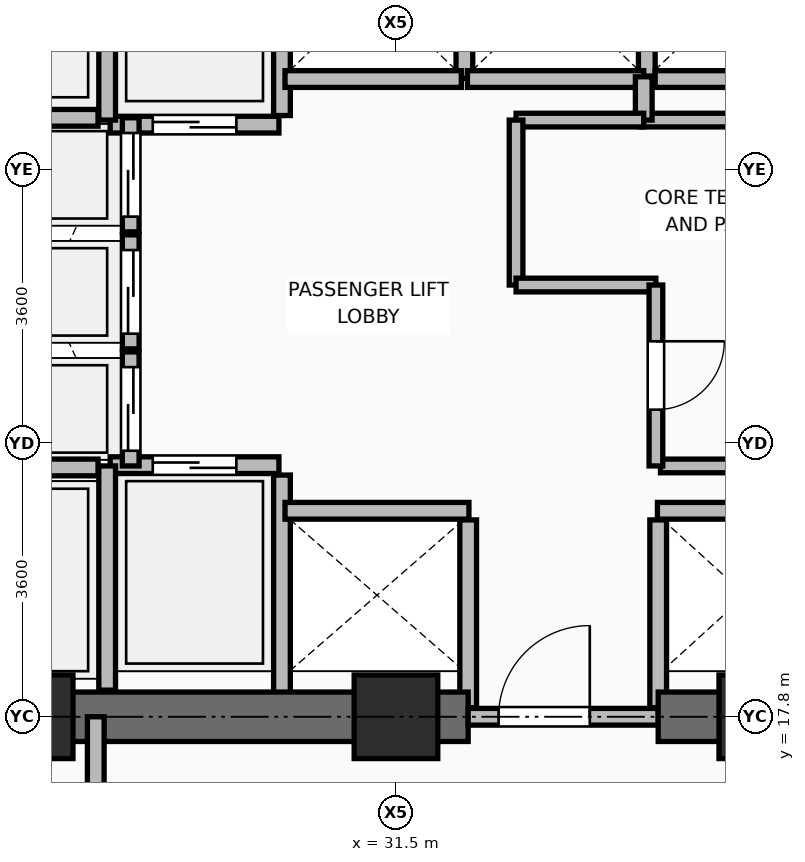
"""IFC4 building model, lengths in metres.
Left out: names, types, materials, properties, quantities, classifications, styles, units other than length and angle.
Written with IfcOpenShell. Run it as: python <this file> out.ifc"""

import sys

from ifc_helpers import new_model, si_unit, direction, frame, frame_2d, origin, origin_2d, place, context, subcontext, project, spatial, rectangle, extrude, element, fill, save


model = new_model("IFC4")
c1 = context("Model", 3, precision=1e-05, world=origin(), true_north=direction((0.0, 1.0)))
c2 = subcontext(c1, "Body", "Model", "MODEL_VIEW")
j1 = project(units=[si_unit("LENGTHUNIT", "METRE"), si_unit("PLANEANGLEUNIT", "RADIAN")], contexts=[c1])
p1 = place(None, origin())
s1 = spatial("IfcSite", under=j1, at=p1, CompositionType="ELEMENT")
p2 = place(p1, origin())
s2 = spatial("IfcBuilding", under=s1, at=p2, CompositionType="ELEMENT")
p3 = place(p2, frame((0.0, 0.0, 49.5)))
s3 = spatial("IfcBuildingStorey", under=s2, at=p3, CompositionType="ELEMENT", Elevation=49.5)
for number, where, z_axis, x_axis in (
    (1, (26.7, 17.8, 0.0), (0.0, 0.0, 1.0), (1.0, 0.0, 0.0)),
    (2, (31.5, 17.8, 0.0), (0.0, 0.0, 1.0), (1.0, 0.0, 0.0)),
    (3, (36.3, 17.8, 0.0), (0.0, 0.0, 1.0), (1.0, 0.0, 0.0)),
):
    element("IfcColumn", number, at=place(p3, frame(where, z_axis=z_axis, x_axis=x_axis)), inside=s3, PredefinedType="COLUMN", context=c2, shape_type="SweptSolid", body=[
        extrude(rectangle(XDim=1.1, YDim=1.1, at=origin_2d()), origin(), (0.0, 0.0, 1.0), 3.75),
    ])
p4 = place(p3, frame((30.0, 18.08, 0.0), z_axis=(0.0, 0.0, 1.0), x_axis=(0.0, 1.0, 0.0)))
e4 = element("IfcWall", 4, at=p4, inside=s3, PredefinedType="PARTITIONING", context=c2, shape_type="SweptSolid", body=[
    extrude(rectangle(XDim=2.9, YDim=0.22, at=frame_2d((1.45, 0.0))), origin(), (0.0, 0.0, 1.0), 3.545),
])
for number, where, z_axis, x_axis in (
    (5, (32.45, 17.92, 0.0), (0.0, 0.0, 1.0), (0.0, 1.0, 0.0)),
    (6, (34.95, 17.92, 0.0), (0.0, 0.0, 1.0), (0.0, 1.0, 0.0)),
):
    element("IfcWall", number, at=place(p3, frame(where, z_axis=z_axis, x_axis=x_axis)), inside=s3, PredefinedType="PARTITIONING", context=c2, shape_type="SweptSolid", body=[
        extrude(rectangle(XDim=2.47, YDim=0.22, at=frame_2d((1.235, 0.0))), origin(), (0.0, 0.0, 1.0), 2.928),
    ])
p5 = place(p3, frame((30.0, 25.71, 0.0), z_axis=(0.0, 0.0, 1.0), x_axis=(0.0, 1.0, 0.0)))
e7 = element("IfcWall", 7, at=p5, inside=s3, PredefinedType="PARTITIONING", context=c2, shape_type="SweptSolid", body=[
    extrude(rectangle(XDim=2.73, YDim=0.22, at=frame_2d((1.365, 0.0))), origin(), (0.0, 0.0, 1.0), 3.545),
])
p6 = place(p3, frame((32.4, 26.2, 0.0), z_axis=(0.0, 0.0, 1.0), x_axis=(0.0, 1.0, 0.0)))
e8 = element("IfcWall", 8, at=p6, inside=s3, PredefinedType="PARTITIONING", context=c2, shape_type="SweptSolid", body=[
    extrude(rectangle(XDim=2.24, YDim=0.22, at=frame_2d((1.12, 0.0))), origin(), (0.0, 0.0, 1.0), 3.545),
])
p7 = place(p3, frame((34.8, 26.23, 0.0), z_axis=(0.0, 0.0, 1.0), x_axis=(0.0, 1.0, 0.0)))
e9 = element("IfcWall", 9, at=p7, inside=s3, PredefinedType="PARTITIONING", context=c2, shape_type="SweptSolid", body=[
    extrude(rectangle(XDim=2.21, YDim=0.22, at=frame_2d((1.105, 0.0))), origin(), (0.0, 0.0, 1.0), 3.545),
])
p8 = place(p3, frame((34.91, 26.19, 0.0), z_axis=(0.0, 0.0, 1.0), x_axis=(1.0, 0.0, 0.0)))
e10 = element("IfcWall", 10, at=p8, inside=s3, PredefinedType="PARTITIONING", context=c2, shape_type="SweptSolid", body=[
    extrude(rectangle(XDim=2.14, YDim=0.22, at=frame_2d((1.07, 0.0))), origin(), (0.0, 0.0, 1.0), 3.545),
])
p9 = place(p3, frame((25.55, 17.8, 0.0), z_axis=(0.0, 0.0, 1.0), x_axis=(1.0, 0.0, 0.0)))
e11 = element("IfcWall", 11, at=p9, inside=s3, PredefinedType="SHEAR", context=c2, shape_type="SweptSolid", body=[
    extrude(rectangle(XDim=6.9, YDim=0.65, at=frame_2d((3.45, 0.0))), origin(), (0.0, 0.0, 1.0), 3.57),
])
p10 = place(p3, frame((32.45, 17.8, 0.0), z_axis=(0.0, 0.0, 1.0), x_axis=(1.0, 0.0, 0.0)))
e12 = element("IfcWall", 12, at=p10, inside=s3, PredefinedType="PARTITIONING", context=c2, shape_type="SweptSolid", body=[
    extrude(rectangle(XDim=2.5, YDim=0.22, at=frame_2d((1.25, 0.0))), origin(), (0.0, 0.0, 1.0), 2.928),
])
p11 = place(p10, frame((0.4, 0.0, 0.0)))
e13 = element("IfcOpeningElement", 13, at=p11, cuts=e12, PredefinedType="OPENING", context=c2, shape_type="SweptSolid", body=[
    extrude(rectangle(XDim=1.2, YDim=2.1, at=frame_2d((0.6, 1.05))), frame((0.0, 0.12, 0.0), z_axis=(0.0, -1.0, 0.0), x_axis=(1.0, 0.0, 0.0)), (0.0, 0.0, 1.0), 0.24),
])
p12 = place(p3, frame((34.95, 17.8, 0.0), z_axis=(0.0, 0.0, 1.0), x_axis=(1.0, 0.0, 0.0)))
e14 = element("IfcWall", 14, at=p12, inside=s3, PredefinedType="SHEAR", context=c2, shape_type="SweptSolid", body=[
    extrude(rectangle(XDim=6.475, YDim=0.65, at=frame_2d((3.238, 0.0))), origin(), (0.0, 0.0, 1.0), 3.57),
])
p13 = place(p3, frame((27.74, 21.11, 0.0), z_axis=(0.0, 0.0, 1.0), x_axis=(1.0, 0.0, 0.0)))
e15 = element("IfcWall", 15, at=p13, inside=s3, PredefinedType="PARTITIONING", context=c2, shape_type="SweptSolid", body=[
    extrude(rectangle(XDim=2.22, YDim=0.22, at=frame_2d((1.11, 0.0))), origin(), (0.0, 0.0, 1.0), 3.55),
])
p14 = place(p13, frame((0.56, 0.0, 0.0)))
e16 = element("IfcOpeningElement", 16, at=p14, cuts=e15, PredefinedType="OPENING", context=c2, shape_type="SweptSolid", body=[
    extrude(rectangle(XDim=1.1, YDim=2.2, at=frame_2d((0.55, 1.1))), frame((0.0, 0.12, 0.0), z_axis=(0.0, -1.0, 0.0), x_axis=(1.0, 0.0, 0.0)), (0.0, 0.0, 1.0), 0.24),
])
p15 = place(p3, frame((27.74, 25.59, 0.0), z_axis=(0.0, 0.0, 1.0), x_axis=(1.0, 0.0, 0.0)))
e17 = element("IfcWall", 17, at=p15, inside=s3, PredefinedType="PARTITIONING", context=c2, shape_type="SweptSolid", body=[
    extrude(rectangle(XDim=2.22, YDim=0.22, at=frame_2d((1.11, 0.0))), origin(), (0.0, 0.0, 1.0), 3.55),
])
p16 = place(p15, frame((0.56, 0.0, 0.0)))
e18 = element("IfcOpeningElement", 18, at=p16, cuts=e17, PredefinedType="OPENING", context=c2, shape_type="SweptSolid", body=[
    extrude(rectangle(XDim=1.1, YDim=2.2, at=frame_2d((0.55, 1.1))), frame((0.0, 0.12, 0.0), z_axis=(0.0, -1.0, 0.0), x_axis=(1.0, 0.0, 0.0)), (0.0, 0.0, 1.0), 0.24),
])
p17 = place(p3, frame((30.04, 20.51, 0.0), z_axis=(0.0, 0.0, 1.0), x_axis=(1.0, 0.0, 0.0)))
e19 = element("IfcWall", 19, at=p17, inside=s3, PredefinedType="PARTITIONING", context=c2, shape_type="SweptSolid", body=[
    extrude(rectangle(XDim=2.42, YDim=0.22, at=frame_2d((1.21, 0.0))), origin(), (0.0, 0.0, 1.0), 3.55),
])
p18 = place(p3, frame((34.94, 20.51, 0.0), z_axis=(0.0, 0.0, 1.0), x_axis=(1.0, 0.0, 0.0)))
e20 = element("IfcWall", 20, at=p18, inside=s3, PredefinedType="PARTITIONING", context=c2, shape_type="SweptSolid", body=[
    extrude(rectangle(XDim=2.24, YDim=0.22, at=frame_2d((1.12, 0.0))), origin(), (0.0, 0.0, 1.0), 3.55),
])
for number, where, z_axis, x_axis in (
    (21, (30.04, 26.19, 0.0), (0.0, 0.0, 1.0), (1.0, 0.0, 0.0)),
    (22, (32.44, 26.19, 0.0), (0.0, 0.0, 1.0), (1.0, 0.0, 0.0)),
):
    element("IfcWall", number, at=place(p3, frame(where, z_axis=z_axis, x_axis=x_axis)), inside=s3, PredefinedType="PARTITIONING", context=c2, shape_type="SweptSolid", body=[
        extrude(rectangle(XDim=2.32, YDim=0.22, at=frame_2d((1.16, 0.0))), origin(), (0.0, 0.0, 1.0), 3.55),
    ])
p19 = place(p3, frame((28.01, 21.1, 0.0), z_axis=(0.0, 0.0, 1.0), x_axis=(0.0, 1.0, 0.0)))
e23 = element("IfcWall", 23, at=p19, inside=s3, PredefinedType="PARTITIONING", context=c2, shape_type="SweptSolid", body=[
    extrude(rectangle(XDim=1.5, YDim=0.22, at=frame_2d((0.75, 0.0))), origin(), (0.0, 0.0, 1.0), 3.55),
])
p20 = place(p19, frame((0.2, 0.0, 0.0)))
e24 = element("IfcOpeningElement", 24, at=p20, cuts=e23, PredefinedType="OPENING", context=c2, shape_type="SweptSolid", body=[
    extrude(rectangle(XDim=1.1, YDim=2.2, at=frame_2d((0.55, 1.1))), frame((0.0, 0.12, 0.0), z_axis=(0.0, -1.0, 0.0), x_axis=(1.0, 0.0, 0.0)), (0.0, 0.0, 1.0), 0.24),
])
p21 = place(p3, frame((28.01, 22.64, 0.0), z_axis=(0.0, 0.0, 1.0), x_axis=(0.0, 1.0, 0.0)))
e25 = element("IfcWall", 25, at=p21, inside=s3, PredefinedType="PARTITIONING", context=c2, shape_type="SweptSolid", body=[
    extrude(rectangle(XDim=1.5, YDim=0.22, at=frame_2d((0.75, 0.0))), origin(), (0.0, 0.0, 1.0), 3.55),
])
p22 = place(p21, frame((0.2, 0.0, 0.0)))
e26 = element("IfcOpeningElement", 26, at=p22, cuts=e25, PredefinedType="OPENING", context=c2, shape_type="SweptSolid", body=[
    extrude(rectangle(XDim=1.1, YDim=2.2, at=frame_2d((0.55, 1.1))), frame((0.0, 0.12, 0.0), z_axis=(0.0, -1.0, 0.0), x_axis=(1.0, 0.0, 0.0)), (0.0, 0.0, 1.0), 0.24),
])
p23 = place(p3, frame((28.01, 24.18, 0.0), z_axis=(0.0, 0.0, 1.0), x_axis=(0.0, 1.0, 0.0)))
e27 = element("IfcWall", 27, at=p23, inside=s3, PredefinedType="PARTITIONING", context=c2, shape_type="SweptSolid", body=[
    extrude(rectangle(XDim=1.5, YDim=0.22, at=frame_2d((0.75, 0.0))), origin(), (0.0, 0.0, 1.0), 3.55),
])
p24 = place(p23, frame((0.2, 0.0, 0.0)))
e28 = element("IfcOpeningElement", 28, at=p24, cuts=e27, PredefinedType="OPENING", context=c2, shape_type="SweptSolid", body=[
    extrude(rectangle(XDim=1.1, YDim=2.2, at=frame_2d((0.55, 1.1))), frame((0.0, 0.12, 0.0), z_axis=(0.0, -1.0, 0.0), x_axis=(1.0, 0.0, 0.0)), (0.0, 0.0, 1.0), 0.24),
])
p25 = place(p3, frame((27.7, 18.15, 0.0), z_axis=(0.0, 0.0, 1.0), x_axis=(0.0, 1.0, 0.0)))
e29 = element("IfcWall", 29, at=p25, inside=s3, PredefinedType="PARTITIONING", context=c2, shape_type="SweptSolid", body=[
    extrude(rectangle(XDim=2.95, YDim=0.22, at=frame_2d((1.475, 0.0))), origin(), (0.0, 0.0, 1.0), 3.55),
])
p26 = place(p3, frame((27.7, 25.65, 0.0), z_axis=(0.0, 0.0, 1.0), x_axis=(0.0, 1.0, 0.0)))
e30 = element("IfcWall", 30, at=p26, inside=s3, PredefinedType="PARTITIONING", context=c2, shape_type="SweptSolid", body=[
    extrude(rectangle(XDim=3.0, YDim=0.22, at=frame_2d((1.5, 0.0))), origin(), (0.0, 0.0, 1.0), 3.55),
])
for number, where, z_axis, x_axis in (
    (31, (25.88, 21.08, 0.0), (0.0, 0.0, 1.0), (1.0, 0.0, 0.0)),
    (32, (25.88, 25.68, 0.0), (0.0, 0.0, 1.0), (1.0, 0.0, 0.0)),
):
    element("IfcWall", number, at=place(p3, frame(where, z_axis=z_axis, x_axis=x_axis)), inside=s3, PredefinedType="PARTITIONING", context=c2, shape_type="SweptSolid", body=[
        extrude(rectangle(XDim=1.7, YDim=0.22, at=frame_2d((0.85, 0.0))), origin(), (0.0, 0.0, 1.0), 3.55),
    ])
p27 = place(p3, frame((34.98, 21.1, 0.0), z_axis=(0.0, 0.0, 1.0), x_axis=(1.0, 0.0, 0.0)))
e33 = element("IfcWall", 33, at=p27, inside=s3, PredefinedType="PARTITIONING", context=c2, shape_type="SweptSolid", body=[
    extrude(rectangle(XDim=2.08, YDim=0.18, at=frame_2d((1.04, 0.0))), origin(), (0.0, 0.0, 1.0), 3.55),
])
p28 = place(p3, frame((34.72, 25.65, 0.0), z_axis=(0.0, 0.0, 1.0), x_axis=(1.0, 0.0, 0.0)))
e34 = element("IfcWall", 34, at=p28, inside=s3, PredefinedType="PARTITIONING", context=c2, shape_type="SweptSolid", body=[
    extrude(rectangle(XDim=2.34, YDim=0.18, at=frame_2d((1.17, 0.0))), origin(), (0.0, 0.0, 1.0), 3.55),
])
p29 = place(p3, frame((34.76, 25.65, 0.0), z_axis=(0.0, 0.0, 1.0), x_axis=(0.0, 1.0, 0.0)))
e35 = element("IfcWall", 35, at=p29, inside=s3, PredefinedType="PARTITIONING", context=c2, shape_type="SweptSolid", body=[
    extrude(rectangle(XDim=0.57, YDim=0.22, at=frame_2d((0.285, 0.0))), origin(), (0.0, 0.0, 1.0), 3.55),
])
p30 = place(p3, frame((33.08, 25.65, 0.0), z_axis=(0.0, 0.0, 1.0), x_axis=(1.0, 0.0, 0.0)))
e36 = element("IfcWall", 36, at=p30, inside=s3, PredefinedType="PARTITIONING", context=c2, shape_type="SweptSolid", body=[
    extrude(rectangle(XDim=1.68, YDim=0.18, at=frame_2d((0.84, 0.0))), origin(), (0.0, 0.0, 1.0), 3.55),
])
p31 = place(p3, frame((33.08, 23.48, 0.0), z_axis=(0.0, 0.0, 1.0), x_axis=(0.0, 1.0, 0.0)))
e37 = element("IfcWall", 37, at=p31, inside=s3, PredefinedType="PARTITIONING", context=c2, shape_type="SweptSolid", body=[
    extrude(rectangle(XDim=2.17, YDim=0.18, at=frame_2d((1.085, 0.0))), origin(), (0.0, 0.0, 1.0), 3.55),
])
p32 = place(p3, frame((33.08, 23.48, 0.0), z_axis=(0.0, 0.0, 1.0), x_axis=(1.0, 0.0, 0.0)))
e38 = element("IfcWall", 38, at=p32, inside=s3, PredefinedType="PARTITIONING", context=c2, shape_type="SweptSolid", body=[
    extrude(rectangle(XDim=1.84, YDim=0.18, at=frame_2d((0.92, 0.0))), origin(), (0.0, 0.0, 1.0), 3.55),
])
p33 = place(p3, frame((34.92, 21.1, 0.0), z_axis=(0.0, 0.0, 1.0), x_axis=(0.0, 1.0, 0.0)))
e39 = element("IfcWall", 39, at=p33, inside=s3, PredefinedType="PARTITIONING", context=c2, shape_type="SweptSolid", body=[
    extrude(rectangle(XDim=2.38, YDim=0.18, at=frame_2d((1.19, 0.0))), origin(), (0.0, 0.0, 1.0), 3.55),
])
p34 = place(p33, frame((0.74, 0.0, 0.0)))
e40 = element("IfcOpeningElement", 40, at=p34, cuts=e39, PredefinedType="OPENING", context=c2, shape_type="SweptSolid", body=[
    extrude(rectangle(XDim=0.9, YDim=2.1, at=frame_2d((0.45, 1.05))), frame((0.0, 0.1, 0.0), z_axis=(0.0, -1.0, 0.0), x_axis=(1.0, 0.0, 0.0)), (0.0, 0.0, 1.0), 0.2),
])
p35 = place(p3, frame((27.55, 14.35, 0.0), z_axis=(0.0, 0.0, 1.0), x_axis=(0.0, 1.0, 0.0)))
e41 = element("IfcWall", 41, at=p35, inside=s3, PredefinedType="PARTITIONING", context=c2, shape_type="SweptSolid", body=[
    extrude(rectangle(XDim=3.45, YDim=0.22, at=frame_2d((1.725, 0.0))), origin(), (0.0, 0.0, 1.0), 2.928),
])
p36 = place(p35, frame((1.175, 0.0, 0.0)))
e42 = element("IfcOpeningElement", 42, at=p36, cuts=e41, PredefinedType="OPENING", context=c2, shape_type="SweptSolid", body=[
    extrude(rectangle(XDim=1.1, YDim=2.1, at=frame_2d((0.55, 1.05))), frame((0.0, 0.12, 0.0), z_axis=(0.0, -1.0, 0.0), x_axis=(1.0, 0.0, 0.0)), (0.0, 0.0, 1.0), 0.24),
])
p37 = place(p11, origin())
e43 = element("IfcDoor", 43, at=p37, inside=s3, OperationType="SINGLE_SWING_RIGHT", PredefinedType="DOOR", context=c2, shape_type="SweptSolid", body=[
    extrude(rectangle(XDim=1.2, YDim=2.1, at=frame_2d((0.6, 1.05))), frame((0.0, 0.025, 0.0), z_axis=(0.0, -1.0, 0.0), x_axis=(1.0, 0.0, 0.0)), (0.0, 0.0, 1.0), 0.05),
])
fill(e13, e43)
p38 = place(p14, origin())
e44 = element("IfcDoor", 44, at=p38, inside=s3, OperationType="DOUBLE_DOOR_SLIDING", PredefinedType="DOOR", context=c2, shape_type="SweptSolid", body=[
    extrude(rectangle(XDim=1.1, YDim=2.2, at=frame_2d((0.55, 1.1))), frame((0.0, 0.025, 0.0), z_axis=(0.0, -1.0, 0.0), x_axis=(1.0, 0.0, 0.0)), (0.0, 0.0, 1.0), 0.05),
])
fill(e16, e44)
p39 = place(p16, frame((1.1, 0.0, 0.0), z_axis=(0.0, 0.0, 1.0), x_axis=(-1.0, 0.0, 0.0)))
e45 = element("IfcDoor", 45, at=p39, inside=s3, OperationType="DOUBLE_DOOR_SLIDING", PredefinedType="DOOR", context=c2, shape_type="SweptSolid", body=[
    extrude(rectangle(XDim=1.1, YDim=2.2, at=frame_2d((0.55, 1.1))), frame((0.0, 0.025, 0.0), z_axis=(0.0, -1.0, 0.0), x_axis=(1.0, 0.0, 0.0)), (0.0, 0.0, 1.0), 0.05),
])
fill(e18, e45)
p40 = place(p20, frame((1.1, 0.0, 0.0), z_axis=(0.0, 0.0, 1.0), x_axis=(-1.0, 0.0, 0.0)))
e46 = element("IfcDoor", 46, at=p40, inside=s3, OperationType="DOUBLE_DOOR_SLIDING", PredefinedType="DOOR", context=c2, shape_type="SweptSolid", body=[
    extrude(rectangle(XDim=1.1, YDim=2.2, at=frame_2d((0.55, 1.1))), frame((0.0, 0.025, 0.0), z_axis=(0.0, -1.0, 0.0), x_axis=(1.0, 0.0, 0.0)), (0.0, 0.0, 1.0), 0.05),
])
fill(e24, e46)
p41 = place(p22, frame((1.1, 0.0, 0.0), z_axis=(0.0, 0.0, 1.0), x_axis=(-1.0, 0.0, 0.0)))
e47 = element("IfcDoor", 47, at=p41, inside=s3, OperationType="DOUBLE_DOOR_SLIDING", PredefinedType="DOOR", context=c2, shape_type="SweptSolid", body=[
    extrude(rectangle(XDim=1.1, YDim=2.2, at=frame_2d((0.55, 1.1))), frame((0.0, 0.025, 0.0), z_axis=(0.0, -1.0, 0.0), x_axis=(1.0, 0.0, 0.0)), (0.0, 0.0, 1.0), 0.05),
])
fill(e26, e47)
p42 = place(p24, frame((1.1, 0.0, 0.0), z_axis=(0.0, 0.0, 1.0), x_axis=(-1.0, 0.0, 0.0)))
e48 = element("IfcDoor", 48, at=p42, inside=s3, OperationType="DOUBLE_DOOR_SLIDING", PredefinedType="DOOR", context=c2, shape_type="SweptSolid", body=[
    extrude(rectangle(XDim=1.1, YDim=2.2, at=frame_2d((0.55, 1.1))), frame((0.0, 0.025, 0.0), z_axis=(0.0, -1.0, 0.0), x_axis=(1.0, 0.0, 0.0)), (0.0, 0.0, 1.0), 0.05),
])
fill(e28, e48)
p43 = place(p34, frame((0.9, 0.0, 0.0), z_axis=(0.0, 0.0, 1.0), x_axis=(-1.0, 0.0, 0.0)))
e49 = element("IfcDoor", 49, at=p43, inside=s3, OperationType="SINGLE_SWING_LEFT", PredefinedType="DOOR", context=c2, shape_type="SweptSolid", body=[
    extrude(rectangle(XDim=0.9, YDim=2.1, at=frame_2d((0.45, 1.05))), frame((0.0, 0.025, 0.0), z_axis=(0.0, -1.0, 0.0), x_axis=(1.0, 0.0, 0.0)), (0.0, 0.0, 1.0), 0.05),
])
fill(e40, e49)
save(model, sys.argv[1])
